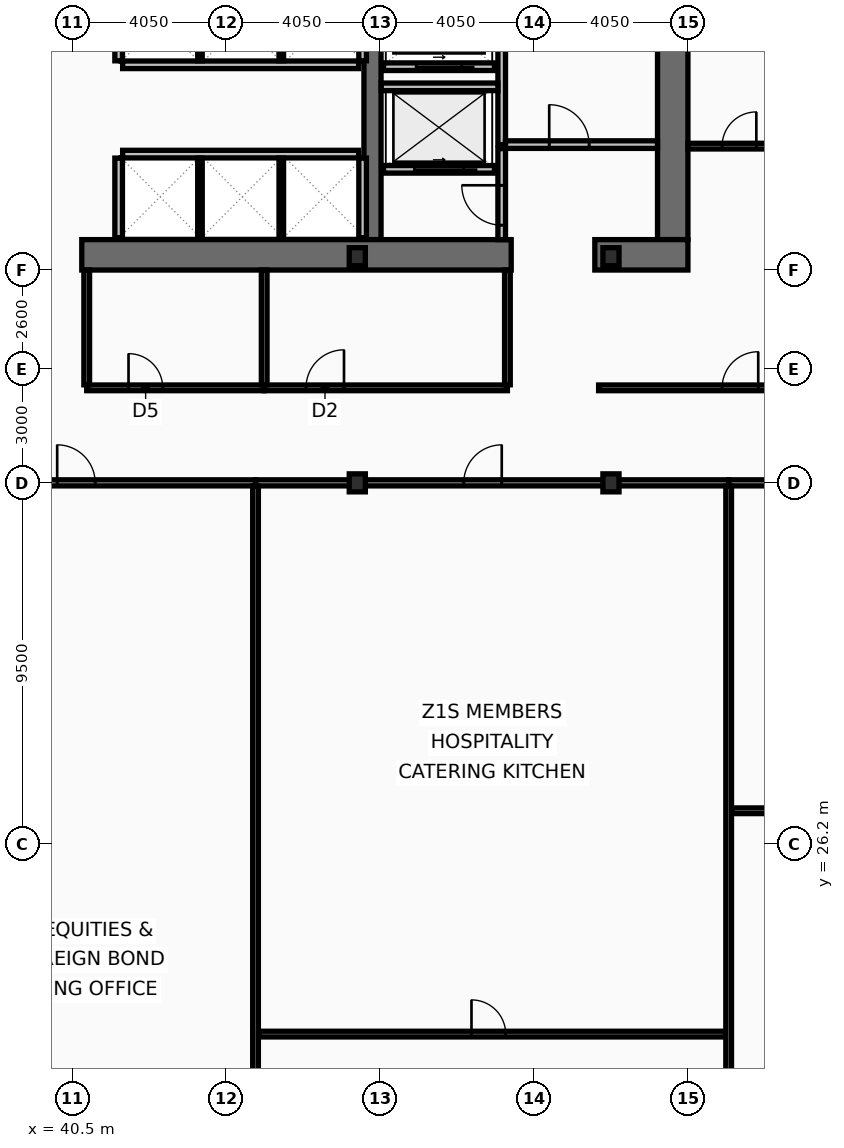
"""IFC4 building model, lengths in metres.
Left out: names, types, materials, properties, quantities, classifications, styles, units other than length and angle.
Written with IfcOpenShell. Run it as: python <this file> out.ifc"""

import sys

from ifc_helpers import new_model, si_unit, direction, frame, frame_2d, origin, origin_2d, place, context, subcontext, project, spatial, rectangle, i_section, extrude, element, fill, save


model = new_model("IFC4")
c1 = context("Model", 3, precision=1e-05, world=origin(), true_north=direction((0.0, 1.0)))
c2 = subcontext(c1, "Body", "Model", "MODEL_VIEW")
j1 = project(units=[si_unit("LENGTHUNIT", "METRE"), si_unit("PLANEANGLEUNIT", "RADIAN")], contexts=[c1])
p1 = place(None, origin())
s1 = spatial("IfcSite", under=j1, at=p1, CompositionType="ELEMENT")
p2 = place(p1, origin())
s2 = spatial("IfcBuilding", under=s1, at=p2, CompositionType="ELEMENT")
p3 = place(p2, frame((0.0, 0.0, 41.8)))
s3 = spatial("IfcBuildingStorey", under=s2, at=p3, CompositionType="ELEMENT", Elevation=41.8)
p4 = place(p3, frame((56.3, 52.9, 0.0), z_axis=(0.0, 0.0, 1.0), x_axis=(0.0, -1.0, 0.0)))
e1 = element("IfcWall", 1, at=p4, inside=s3, PredefinedType="SHEAR", context=c2, shape_type="SweptSolid", body=[
    extrude(rectangle(XDim=10.8, YDim=0.8, at=frame_2d((5.4, 0.0))), origin(), (0.0, 0.0, 1.0), 3.82),
])
p5 = place(p3, frame((48.4, 42.1, 0.0), z_axis=(0.0, 0.0, 1.0), x_axis=(0.0, 1.0, 0.0)))
e2 = element("IfcWall", 2, at=p5, inside=s3, PredefinedType="SHEAR", context=c2, shape_type="SweptSolid", body=[
    extrude(rectangle(XDim=10.8, YDim=0.45, at=frame_2d((5.4, 0.0))), origin(), (0.0, 0.0, 1.0), 3.82),
])
p6 = place(p3, frame((52.05, 41.7, 0.0), z_axis=(0.0, 0.0, 1.0), x_axis=(-1.0, 0.0, 0.0)))
e3 = element("IfcWall", 3, at=p6, inside=s3, PredefinedType="SHEAR", context=c2, shape_type="SweptSolid", body=[
    extrude(rectangle(XDim=11.3, YDim=0.8, at=frame_2d((5.65, 0.0))), origin(), (0.0, 0.0, 1.0), 3.82),
])
p7 = place(p3, frame((56.7, 41.7, 0.0), z_axis=(0.0, 0.0, 1.0), x_axis=(-1.0, 0.0, 0.0)))
e4 = element("IfcWall", 4, at=p7, inside=s3, PredefinedType="SHEAR", context=c2, shape_type="SweptSolid", body=[
    extrude(rectangle(XDim=2.45, YDim=0.8, at=frame_2d((1.225, 0.0))), origin(), (0.0, 0.0, 1.0), 3.82),
])
for number, where, z_axis, x_axis in (
    (5, (48.0, 35.7, 0.0), (0.0, 0.0, 1.0), (1.0, 0.0, 0.0)),
    (6, (48.0, 41.65, 0.0), (0.0, 0.0, 1.0), (1.0, 0.0, 0.0)),
    (7, (54.675, 35.7, 0.0), (0.0, 0.0, 1.0), (1.0, 0.0, 0.0)),
    (8, (54.675, 41.65, 0.0), (0.0, 0.0, 1.0), (1.0, 0.0, 0.0)),
):
    element("IfcColumn", number, at=place(p3, frame(where, z_axis=z_axis, x_axis=x_axis)), inside=s3, PredefinedType="COLUMN", context=c2, shape_type="SweptSolid", body=[
        extrude(i_section(OverallWidth=0.424, OverallDepth=0.474, WebThickness=0.048, FlangeThickness=0.077, at=origin_2d()), origin(), (0.0, 0.0, 1.0), 4.0),
    ])
p8 = place(p3, frame((51.61, 43.95, 0.0), z_axis=(0.0, 0.0, 1.0), x_axis=(-1.0, 0.0, 0.0)))
e9 = element("IfcWall", 9, at=p8, inside=s3, PredefinedType="PARTITIONING", context=c2, shape_type="SweptSolid", body=[
    extrude(rectangle(XDim=2.92, YDim=0.2, at=frame_2d((1.46, 0.0))), origin(), (0.0, 0.0, 1.0), 3.82),
])
p9 = place(p8, frame((0.81, 0.0, 0.0)))
e10 = element("IfcOpeningElement", 10, at=p9, cuts=e9, PredefinedType="OPENING", context=c2, shape_type="SweptSolid", body=[
    extrude(rectangle(XDim=1.3, YDim=2.18, at=frame_2d((0.65, 1.09))), frame((0.0, 0.11, 0.0), z_axis=(0.0, -1.0, 0.0), x_axis=(1.0, 0.0, 0.0)), (0.0, 0.0, 1.0), 0.22),
])
p10 = place(p3, frame((51.61, 46.65, 0.0), z_axis=(0.0, 0.0, 1.0), x_axis=(-1.0, 0.0, 0.0)))
e11 = element("IfcWall", 11, at=p10, inside=s3, PredefinedType="PARTITIONING", context=c2, shape_type="SweptSolid", body=[
    extrude(rectangle(XDim=2.92, YDim=0.2, at=frame_2d((1.46, 0.0))), origin(), (0.0, 0.0, 1.0), 3.82),
])
p11 = place(p10, frame((0.86, 0.0, 0.0)))
e12 = element("IfcOpeningElement", 12, at=p11, cuts=e11, PredefinedType="OPENING", context=c2, shape_type="SweptSolid", body=[
    extrude(rectangle(XDim=1.2, YDim=2.18, at=frame_2d((0.6, 1.09))), frame((0.0, 0.11, 0.0), z_axis=(0.0, -1.0, 0.0), x_axis=(1.0, 0.0, 0.0)), (0.0, 0.0, 1.0), 0.22),
])
p12 = place(p3, frame((51.8, 44.6, 0.0), z_axis=(0.0, 0.0, 1.0), x_axis=(0.0, 1.0, 0.0)))
e13 = element("IfcWall", 13, at=p12, inside=s3, PredefinedType="PARTITIONING", context=c2, shape_type="SweptSolid", body=[
    extrude(rectangle(XDim=4.3, YDim=0.2, at=frame_2d((2.15, 0.0))), origin(), (0.0, 0.0, 1.0), 3.82),
])
p13 = place(p3, frame((51.9, 44.6, 0.0), z_axis=(0.0, 0.0, 1.0), x_axis=(1.0, 0.0, 0.0)))
e14 = element("IfcWall", 14, at=p13, inside=s3, PredefinedType="PARTITIONING", context=c2, shape_type="SweptSolid", body=[
    extrude(rectangle(XDim=4.0, YDim=0.2, at=frame_2d((2.0, 0.0))), origin(), (0.0, 0.0, 1.0), 3.82),
])
p14 = place(p13, frame((1.15, 0.0, 0.0)))
e15 = element("IfcOpeningElement", 15, at=p14, cuts=e14, PredefinedType="OPENING", context=c2, shape_type="SweptSolid", body=[
    extrude(rectangle(XDim=1.05, YDim=2.15, at=frame_2d((0.525, 1.075))), frame((0.0, 0.11, 0.0), z_axis=(0.0, -1.0, 0.0), x_axis=(1.0, 0.0, 0.0)), (0.0, 0.0, 1.0), 0.22),
])
p15 = place(p3, frame((48.63, 46.12, 0.0), z_axis=(0.0, 0.0, 1.0), x_axis=(1.0, 0.0, 0.0)))
e16 = element("IfcWall", 16, at=p15, inside=s3, PredefinedType="PARTITIONING", context=c2, shape_type="SweptSolid", body=[
    extrude(rectangle(XDim=3.07, YDim=0.2, at=frame_2d((1.535, 0.0))), origin(), (0.0, 0.0, 1.0), 3.82),
])
p16 = place(p3, frame((51.8, 42.1, 0.0), z_axis=(0.0, 0.0, 1.0), x_axis=(0.0, 1.0, 0.0)))
e17 = element("IfcWall", 17, at=p16, inside=s3, PredefinedType="PARTITIONING", context=c2, shape_type="SweptSolid", body=[
    extrude(rectangle(XDim=2.395, YDim=0.2, at=frame_2d((1.198, 0.0))), origin(), (0.0, 0.0, 1.0), 3.82),
])
p17 = place(p16, frame((0.38, 0.0, 0.0)))
e18 = element("IfcOpeningElement", 18, at=p17, cuts=e17, PredefinedType="OPENING", context=c2, shape_type="SweptSolid", body=[
    extrude(rectangle(XDim=1.05, YDim=2.15, at=frame_2d((0.525, 1.075))), frame((0.0, 0.11, 0.0), z_axis=(0.0, -1.0, 0.0), x_axis=(1.0, 0.0, 0.0)), (0.0, 0.0, 1.0), 0.22),
])
p18 = place(p3, frame((41.825, 46.7, 0.0), z_axis=(0.0, 0.0, 1.0), x_axis=(1.0, 0.0, 0.0)))
e19 = element("IfcWall", 19, at=p18, inside=s3, PredefinedType="PARTITIONING", context=c2, shape_type="SweptSolid", body=[
    extrude(rectangle(XDim=6.21, YDim=0.2, at=frame_2d((3.105, 0.0))), origin(), (0.0, 0.0, 1.0), 3.82),
])
for number, where, z_axis, x_axis in (
    (20, (41.72, 46.805, 0.0), (0.0, 0.0, 1.0), (0.0, 1.0, 0.0)),
    (21, (48.14, 46.805, 0.0), (0.0, 0.0, 1.0), (0.0, 1.0, 0.0)),
):
    element("IfcWall", number, at=place(p3, frame(where, z_axis=z_axis, x_axis=x_axis)), inside=s3, PredefinedType="PARTITIONING", context=c2, shape_type="SweptSolid", body=[
        extrude(rectangle(XDim=2.09, YDim=0.2, at=frame_2d((1.045, 0.0))), origin(), (0.0, 0.0, 1.0), 3.82),
    ])
for number, where, z_axis, x_axis in (
    (22, (43.86, 46.805, 0.0), (0.0, 0.0, 1.0), (0.0, 1.0, 0.0)),
    (23, (46.0, 46.805, 0.0), (0.0, 0.0, 1.0), (0.0, 1.0, 0.0)),
):
    element("IfcWall", number, at=place(p3, frame(where, z_axis=z_axis, x_axis=x_axis)), inside=s3, PredefinedType="PARTITIONING", context=c2, shape_type="SweptSolid", body=[
        extrude(rectangle(XDim=2.09, YDim=0.12, at=frame_2d((1.045, 0.0))), origin(), (0.0, 0.0, 1.0), 3.82),
    ])
p19 = place(p3, frame((41.825, 44.35, 0.0), z_axis=(0.0, 0.0, 1.0), x_axis=(1.0, 0.0, 0.0)))
e24 = element("IfcWall", 24, at=p19, inside=s3, PredefinedType="PARTITIONING", context=c2, shape_type="SweptSolid", body=[
    extrude(rectangle(XDim=6.21, YDim=0.2, at=frame_2d((3.105, 0.0))), origin(), (0.0, 0.0, 1.0), 3.82),
])
for number, where, z_axis, x_axis in (
    (25, (41.72, 42.15, 0.0), (0.0, 0.0, 1.0), (0.0, 1.0, 0.0)),
    (26, (48.14, 42.15, 0.0), (0.0, 0.0, 1.0), (0.0, 1.0, 0.0)),
):
    element("IfcWall", number, at=place(p3, frame(where, z_axis=z_axis, x_axis=x_axis)), inside=s3, PredefinedType="PARTITIONING", context=c2, shape_type="SweptSolid", body=[
        extrude(rectangle(XDim=2.095, YDim=0.2, at=frame_2d((1.048, 0.0))), origin(), (0.0, 0.0, 1.0), 3.82),
    ])
for number, where, z_axis, x_axis in (
    (27, (43.86, 42.15, 0.0), (0.0, 0.0, 1.0), (0.0, 1.0, 0.0)),
    (28, (46.0, 42.15, 0.0), (0.0, 0.0, 1.0), (0.0, 1.0, 0.0)),
):
    element("IfcWall", number, at=place(p3, frame(where, z_axis=z_axis, x_axis=x_axis)), inside=s3, PredefinedType="PARTITIONING", context=c2, shape_type="SweptSolid", body=[
        extrude(rectangle(XDim=2.095, YDim=0.12, at=frame_2d((1.048, 0.0))), origin(), (0.0, 0.0, 1.0), 3.82),
    ])
p20 = place(p3, frame((40.88, 38.2, 0.0), z_axis=(0.0, 0.0, 1.0), x_axis=(1.0, 0.0, 0.0)))
e29 = element("IfcWall", 29, at=p20, inside=s3, PredefinedType="PARTITIONING", context=c2, shape_type="SweptSolid", body=[
    extrude(rectangle(XDim=4.67, YDim=0.15, at=frame_2d((2.335, 0.0))), origin(), (0.0, 0.0, 1.0), 3.01),
])
p21 = place(p20, frame((1.1, 0.0, 0.0)))
e30 = element("IfcOpeningElement", 30, at=p21, cuts=e29, PredefinedType="OPENING", context=c2, shape_type="SweptSolid", body=[
    extrude(rectangle(XDim=0.9, YDim=2.05, at=frame_2d((0.45, 1.025))), frame((0.0, 0.085, 0.0), z_axis=(0.0, -1.0, 0.0), x_axis=(1.0, 0.0, 0.0)), (0.0, 0.0, 1.0), 0.17),
])
p22 = place(p3, frame((45.55, 38.2, 0.0), z_axis=(0.0, 0.0, 1.0), x_axis=(1.0, 0.0, 0.0)))
e31 = element("IfcWall", 31, at=p22, inside=s3, PredefinedType="PARTITIONING", context=c2, shape_type="SweptSolid", body=[
    extrude(rectangle(XDim=6.4, YDim=0.15, at=frame_2d((3.2, 0.0))), origin(), (0.0, 0.0, 1.0), 3.01),
])
p23 = place(p22, frame((1.1, 0.0, 0.0)))
e32 = element("IfcOpeningElement", 32, at=p23, cuts=e31, PredefinedType="OPENING", context=c2, shape_type="SweptSolid", body=[
    extrude(rectangle(XDim=1.0, YDim=2.05, at=frame_2d((0.5, 1.025))), frame((0.0, 0.085, 0.0), z_axis=(0.0, -1.0, 0.0), x_axis=(1.0, 0.0, 0.0)), (0.0, 0.0, 1.0), 0.17),
])
for number, where, z_axis, x_axis in (
    (33, (40.88, 38.28, 0.0), (0.0, 0.0, 1.0), (0.0, 1.0, 0.0)),
    (34, (45.55, 38.28, 0.0), (0.0, 0.0, 1.0), (0.0, 1.0, 0.0)),
    (35, (51.95, 38.28, 0.0), (0.0, 0.0, 1.0), (0.0, 1.0, 0.0)),
):
    element("IfcWall", number, at=place(p3, frame(where, z_axis=z_axis, x_axis=x_axis)), inside=s3, PredefinedType="PARTITIONING", context=c2, shape_type="SweptSolid", body=[
        extrude(rectangle(XDim=3.02, YDim=0.15, at=frame_2d((1.51, 0.0))), origin(), (0.0, 0.0, 1.0), 3.82),
    ])
p24 = place(p3, frame((54.35, 38.2, 0.0), z_axis=(0.0, 0.0, 1.0), x_axis=(1.0, 0.0, 0.0)))
e36 = element("IfcWall", 36, at=p24, inside=s3, PredefinedType="PARTITIONING", context=c2, shape_type="SweptSolid", body=[
    extrude(rectangle(XDim=16.52, YDim=0.15, at=frame_2d((8.26, 0.0))), origin(), (0.0, 0.0, 1.0), 3.01),
])
p25 = place(p24, frame((3.25, 0.0, 0.0)))
e37 = element("IfcOpeningElement", 37, at=p25, cuts=e36, PredefinedType="OPENING", context=c2, shape_type="SweptSolid", body=[
    extrude(rectangle(XDim=0.95, YDim=2.05, at=frame_2d((0.475, 1.025))), frame((0.0, 0.085, 0.0), z_axis=(0.0, -1.0, 0.0), x_axis=(1.0, 0.0, 0.0)), (0.0, 0.0, 1.0), 0.17),
])
p26 = place(p3, frame((56.7, 44.56, 0.0), z_axis=(0.0, 0.0, 1.0), x_axis=(1.0, 0.0, 0.0)))
e38 = element("IfcWall", 38, at=p26, inside=s3, PredefinedType="PARTITIONING", context=c2, shape_type="SweptSolid", body=[
    extrude(rectangle(XDim=14.105, YDim=0.15, at=frame_2d((7.052, 0.0))), origin(), (0.0, 0.0, 1.0), 3.16),
])
p27 = place(p26, frame((0.9, 0.0, 0.0)))
e39 = element("IfcOpeningElement", 39, at=p27, cuts=e38, PredefinedType="OPENING", context=c2, shape_type="SweptSolid", body=[
    extrude(rectangle(XDim=0.9, YDim=2.05, at=frame_2d((0.45, 1.025))), frame((0.0, 0.085, 0.0), z_axis=(0.0, -1.0, 0.0), x_axis=(1.0, 0.0, 0.0)), (0.0, 0.0, 1.0), 0.17),
])
p28 = place(p3, frame((35.892, 35.7, 0.0), z_axis=(0.0, 0.0, 1.0), x_axis=(1.0, 0.0, 0.0)))
e40 = element("IfcWall", 40, at=p28, inside=s3, PredefinedType="PARTITIONING", context=c2, shape_type="SweptSolid", body=[
    extrude(rectangle(XDim=9.43, YDim=0.16, at=frame_2d((4.715, 0.0))), origin(), (0.0, 0.0, 1.0), 3.01),
])
p29 = place(p28, frame((4.211, 0.0, 0.0)))
e41 = element("IfcOpeningElement", 41, at=p29, cuts=e40, PredefinedType="OPENING", context=c2, shape_type="SweptSolid", body=[
    extrude(rectangle(XDim=1.0, YDim=2.05, at=frame_2d((0.5, 1.025))), frame((0.0, 0.09, 0.0), z_axis=(0.0, -1.0, 0.0), x_axis=(1.0, 0.0, 0.0)), (0.0, 0.0, 1.0), 0.18),
])
p30 = place(p3, frame((45.322, 35.7, 0.0), z_axis=(0.0, 0.0, 1.0), x_axis=(1.0, 0.0, 0.0)))
e42 = element("IfcWall", 42, at=p30, inside=s3, PredefinedType="PARTITIONING", context=c2, shape_type="SweptSolid", body=[
    extrude(rectangle(XDim=12.45, YDim=0.16, at=frame_2d((6.225, 0.0))), origin(), (0.0, 0.0, 1.0), 3.01),
])
p31 = place(p30, frame((5.479, 0.0, 0.0)))
e43 = element("IfcOpeningElement", 43, at=p31, cuts=e42, PredefinedType="OPENING", context=c2, shape_type="SweptSolid", body=[
    extrude(rectangle(XDim=1.0, YDim=2.05, at=frame_2d((0.5, 1.025))), frame((0.0, 0.09, 0.0), z_axis=(0.0, -1.0, 0.0), x_axis=(1.0, 0.0, 0.0)), (0.0, 0.0, 1.0), 0.18),
])
p32 = place(p3, frame((45.322, 10.665, 0.0), z_axis=(0.0, 0.0, 1.0), x_axis=(0.0, 1.0, 0.0)))
e44 = element("IfcWall", 44, at=p32, inside=s3, PredefinedType="PARTITIONING", context=c2, shape_type="SweptSolid", body=[
    extrude(rectangle(XDim=24.95, YDim=0.15, at=frame_2d((12.475, 0.0))), origin(), (0.0, 0.0, 1.0), 3.21),
])
p33 = place(p3, frame((45.402, 21.196, 0.0), z_axis=(0.0, 0.0, 1.0), x_axis=(1.0, 0.0, 0.0)))
e45 = element("IfcWall", 45, at=p33, inside=s3, PredefinedType="PARTITIONING", context=c2, shape_type="SweptSolid", body=[
    extrude(rectangle(XDim=12.29, YDim=0.15, at=frame_2d((6.145, 0.0))), origin(), (0.0, 0.0, 1.0), 3.01),
])
p34 = place(p33, frame((5.603, 0.0, 0.0)))
e46 = element("IfcOpeningElement", 46, at=p34, cuts=e45, PredefinedType="OPENING", context=c2, shape_type="SweptSolid", body=[
    extrude(rectangle(XDim=0.9, YDim=2.05, at=frame_2d((0.45, 1.025))), frame((0.0, 0.085, 0.0), z_axis=(0.0, -1.0, 0.0), x_axis=(1.0, 0.0, 0.0)), (0.0, 0.0, 1.0), 0.17),
])
p35 = place(p3, frame((57.772, 35.7, 0.0), z_axis=(0.0, 0.0, 1.0), x_axis=(1.0, 0.0, 0.0)))
e47 = element("IfcWall", 47, at=p35, inside=s3, PredefinedType="PARTITIONING", context=c2, shape_type="SweptSolid", body=[
    extrude(rectangle(XDim=13.098, YDim=0.16, at=frame_2d((6.549, 0.0))), origin(), (0.0, 0.0, 1.0), 3.01),
])
p36 = place(p35, frame((5.751, 0.0, 0.0)))
e48 = element("IfcOpeningElement", 48, at=p36, cuts=e47, PredefinedType="OPENING", context=c2, shape_type="SweptSolid", body=[
    extrude(rectangle(XDim=1.0, YDim=2.05, at=frame_2d((0.5, 1.025))), frame((0.0, 0.09, 0.0), z_axis=(0.0, -1.0, 0.0), x_axis=(1.0, 0.0, 0.0)), (0.0, 0.0, 1.0), 0.18),
])
p37 = place(p3, frame((57.772, 10.665, 0.0), z_axis=(0.0, 0.0, 1.0), x_axis=(0.0, 1.0, 0.0)))
e49 = element("IfcWall", 49, at=p37, inside=s3, PredefinedType="PARTITIONING", context=c2, shape_type="SweptSolid", body=[
    extrude(rectangle(XDim=24.95, YDim=0.15, at=frame_2d((12.475, 0.0))), origin(), (0.0, 0.0, 1.0), 3.01),
])
p38 = place(p3, frame((57.852, 27.072, 0.0), z_axis=(0.0, 0.0, 1.0), x_axis=(1.0, 0.0, 0.0)))
e50 = element("IfcWall", 50, at=p38, inside=s3, PredefinedType="PARTITIONING", context=c2, shape_type="SweptSolid", body=[
    extrude(rectangle(XDim=12.953, YDim=0.15, at=frame_2d((6.477, 0.0))), origin(), (0.0, 0.0, 1.0), 3.82),
])
p39 = place(p38, frame((5.894, 0.0, 0.0)))
e51 = element("IfcOpeningElement", 51, at=p39, cuts=e50, PredefinedType="OPENING", context=c2, shape_type="SweptSolid", body=[
    extrude(rectangle(XDim=0.9, YDim=2.05, at=frame_2d((0.45, 1.025))), frame((0.0, 0.085, 0.0), z_axis=(0.0, -1.0, 0.0), x_axis=(1.0, 0.0, 0.0)), (0.0, 0.0, 1.0), 0.17),
])
p40 = place(p9, origin())
e52 = element("IfcDoor", 52, at=p40, inside=s3, OperationType="SLIDING_TO_LEFT", PredefinedType="DOOR", context=c2, shape_type="SweptSolid", body=[
    extrude(rectangle(XDim=1.3, YDim=2.18, at=frame_2d((0.65, 1.09))), frame((0.0, 0.025, 0.0), z_axis=(0.0, -1.0, 0.0), x_axis=(1.0, 0.0, 0.0)), (0.0, 0.0, 1.0), 0.05),
])
fill(e10, e52)
p41 = place(p11, origin())
e53 = element("IfcDoor", 53, at=p41, inside=s3, OperationType="SLIDING_TO_LEFT", PredefinedType="DOOR", context=c2, shape_type="SweptSolid", body=[
    extrude(rectangle(XDim=1.2, YDim=2.18, at=frame_2d((0.6, 1.09))), frame((0.0, 0.025, 0.0), z_axis=(0.0, -1.0, 0.0), x_axis=(1.0, 0.0, 0.0)), (0.0, 0.0, 1.0), 0.05),
])
fill(e12, e53)
p42 = place(p14, origin())
e54 = element("IfcDoor", 54, at=p42, inside=s3, OperationType="SINGLE_SWING_LEFT", PredefinedType="DOOR", context=c2, shape_type="SweptSolid", body=[
    extrude(rectangle(XDim=1.05, YDim=2.15, at=frame_2d((0.525, 1.075))), frame((0.0, 0.025, 0.0), z_axis=(0.0, -1.0, 0.0), x_axis=(1.0, 0.0, 0.0)), (0.0, 0.0, 1.0), 0.05),
])
fill(e15, e54)
p43 = place(p17, origin())
e55 = element("IfcDoor", 55, at=p43, inside=s3, OperationType="SINGLE_SWING_RIGHT", PredefinedType="DOOR", context=c2, shape_type="SweptSolid", body=[
    extrude(rectangle(XDim=1.05, YDim=2.15, at=frame_2d((0.525, 1.075))), frame((0.0, 0.025, 0.0), z_axis=(0.0, -1.0, 0.0), x_axis=(1.0, 0.0, 0.0)), (0.0, 0.0, 1.0), 0.05),
])
fill(e18, e55)
p44 = place(p21, origin())
e56 = element("IfcDoor", 56, at=p44, inside=s3, OperationType="SINGLE_SWING_LEFT", PredefinedType="DOOR", context=c2, shape_type="SweptSolid", body=[
    extrude(rectangle(XDim=0.9, YDim=2.05, at=frame_2d((0.45, 1.025))), frame((0.0, 0.025, 0.0), z_axis=(0.0, -1.0, 0.0), x_axis=(1.0, 0.0, 0.0)), (0.0, 0.0, 1.0), 0.05),
])
fill(e30, e56)
p45 = place(p23, origin())
e57 = element("IfcDoor", 57, at=p45, inside=s3, OperationType="SINGLE_SWING_RIGHT", PredefinedType="DOOR", context=c2, shape_type="SweptSolid", body=[
    extrude(rectangle(XDim=1.0, YDim=2.05, at=frame_2d((0.5, 1.025))), frame((0.0, 0.025, 0.0), z_axis=(0.0, -1.0, 0.0), x_axis=(1.0, 0.0, 0.0)), (0.0, 0.0, 1.0), 0.05),
])
fill(e32, e57)
p46 = place(p25, origin())
e58 = element("IfcDoor", 58, at=p46, inside=s3, OperationType="SINGLE_SWING_RIGHT", PredefinedType="DOOR", context=c2, shape_type="SweptSolid", body=[
    extrude(rectangle(XDim=0.95, YDim=2.05, at=frame_2d((0.475, 1.025))), frame((0.0, 0.025, 0.0), z_axis=(0.0, -1.0, 0.0), x_axis=(1.0, 0.0, 0.0)), (0.0, 0.0, 1.0), 0.05),
])
fill(e37, e58)
p47 = place(p27, origin())
e59 = element("IfcDoor", 59, at=p47, inside=s3, OperationType="SINGLE_SWING_RIGHT", PredefinedType="DOOR", context=c2, shape_type="SweptSolid", body=[
    extrude(rectangle(XDim=0.9, YDim=2.05, at=frame_2d((0.45, 1.025))), frame((0.0, 0.025, 0.0), z_axis=(0.0, -1.0, 0.0), x_axis=(1.0, 0.0, 0.0)), (0.0, 0.0, 1.0), 0.05),
])
fill(e39, e59)
p48 = place(p29, origin())
e60 = element("IfcDoor", 60, at=p48, inside=s3, OperationType="SINGLE_SWING_LEFT", PredefinedType="DOOR", context=c2, shape_type="SweptSolid", body=[
    extrude(rectangle(XDim=1.0, YDim=2.05, at=frame_2d((0.5, 1.025))), frame((0.0, 0.025, 0.0), z_axis=(0.0, -1.0, 0.0), x_axis=(1.0, 0.0, 0.0)), (0.0, 0.0, 1.0), 0.05),
])
fill(e41, e60)
p49 = place(p31, origin())
e61 = element("IfcDoor", 61, at=p49, inside=s3, OperationType="SINGLE_SWING_RIGHT", PredefinedType="DOOR", context=c2, shape_type="SweptSolid", body=[
    extrude(rectangle(XDim=1.0, YDim=2.05, at=frame_2d((0.5, 1.025))), frame((0.0, 0.025, 0.0), z_axis=(0.0, -1.0, 0.0), x_axis=(1.0, 0.0, 0.0)), (0.0, 0.0, 1.0), 0.05),
])
fill(e43, e61)
p50 = place(p34, origin())
e62 = element("IfcDoor", 62, at=p50, inside=s3, OperationType="SINGLE_SWING_LEFT", PredefinedType="DOOR", context=c2, shape_type="SweptSolid", body=[
    extrude(rectangle(XDim=0.9, YDim=2.05, at=frame_2d((0.45, 1.025))), frame((0.0, 0.025, 0.0), z_axis=(0.0, -1.0, 0.0), x_axis=(1.0, 0.0, 0.0)), (0.0, 0.0, 1.0), 0.05),
])
fill(e46, e62)
save(model, sys.argv[1])
